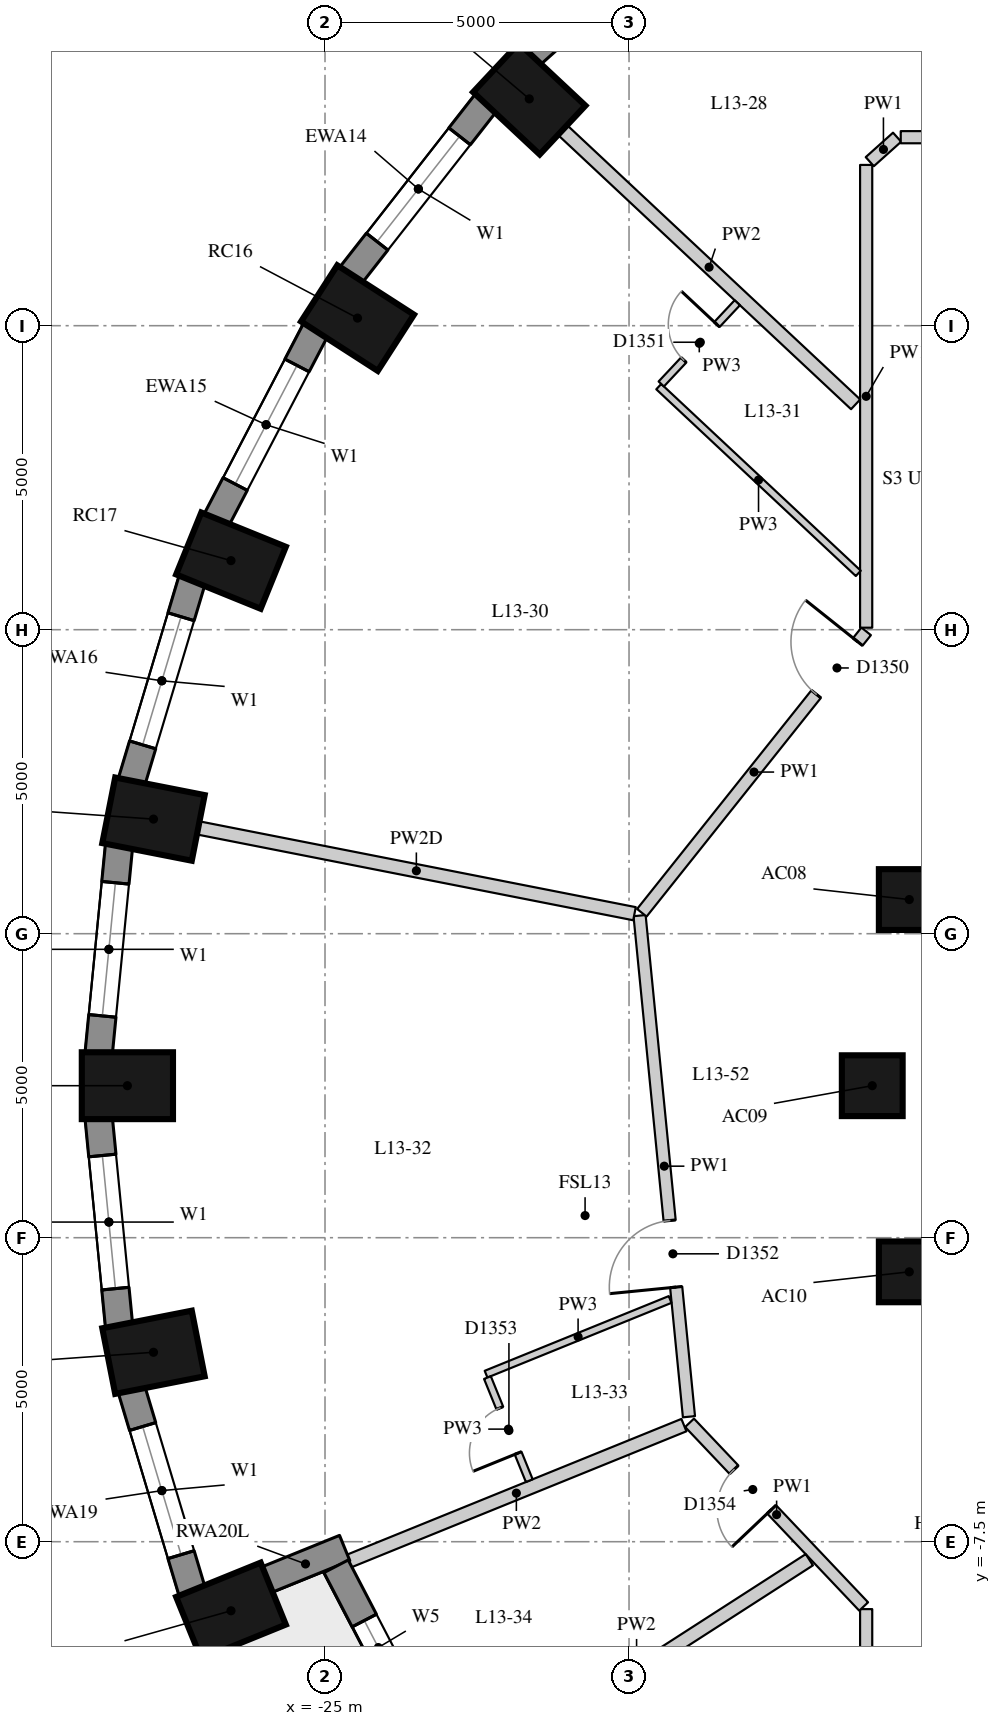
"""IFC4 building model, lengths in metres.
Left out: names, types, materials, properties, quantities, classifications, styles, units other than length and angle.
Written with IfcOpenShell. Run it as: python <this file> out.ifc"""

import sys

from ifc_helpers import new_model, si_unit, direction, frame, frame_2d, origin, origin_2d, place, context, subcontext, project, spatial, rectangle, extrude, element, fill, save


model = new_model("IFC4")
c1 = context("Model", 3, precision=1e-05, world=origin(), true_north=direction((0.0, 1.0)))
c2 = subcontext(c1, "Body", "Model", "MODEL_VIEW")
j1 = project(units=[si_unit("LENGTHUNIT", "METRE"), si_unit("PLANEANGLEUNIT", "RADIAN")], contexts=[c1])
p1 = place(None, origin())
s1 = spatial("IfcSite", under=j1, at=p1, CompositionType="ELEMENT")
p2 = place(p1, origin())
s2 = spatial("IfcBuilding", under=s1, at=p2, CompositionType="ELEMENT")
p3 = place(p2, frame((0.0, 0.0, 51.4)))
s3 = spatial("IfcBuildingStorey", under=s2, at=p3, CompositionType="ELEMENT", Elevation=51.4)
for number, where, z_axis, x_axis in (
    (1, (-21.641, 16.23, 0.0), (0.0, 0.0, 1.0), (-0.73, 0.683, 0.0)),
    (2, (-24.465, 12.625, 0.0), (0.0, 0.0, 1.0), (-0.841, 0.541, 0.0)),
    (3, (-26.546, 8.636, 0.0), (0.0, 0.0, 1.0), (-0.927, 0.376, 0.0)),
    (4, (-27.821, 4.385, 0.0), (0.0, 0.0, 1.0), (-0.981, 0.193, 0.0)),
    (5, (-28.25, 0.0, 0.0), (0.0, 0.0, 1.0), (-1.0, 0.0, 0.0)),
    (6, (-27.821, -4.385, 0.0), (0.0, 0.0, 1.0), (-0.981, -0.193, 0.0)),
    (7, (-26.546, -8.636, 0.0), (0.0, 0.0, 1.0), (-0.927, -0.376, 0.0)),
):
    element("IfcColumn", number, at=place(p3, frame(where, z_axis=z_axis, x_axis=x_axis)), inside=s3, PredefinedType="COLUMN", context=c2, shape_type="SweptSolid", body=[
        extrude(rectangle(XDim=1.5, YDim=1.1, at=origin_2d()), origin(), (0.0, 0.0, 1.0), 3.3),
    ])
for number, where, z_axis, x_axis in (
    (8, (-15.391, 3.062, 0.0), (0.0, 0.0, 1.0), (1.0, 0.0, 0.0)),
    (9, (-16.0, 0.0, 0.0), (0.0, 0.0, 1.0), (1.0, 0.0, 0.0)),
    (10, (-15.391, -3.062, 0.0), (0.0, 0.0, 1.0), (1.0, 0.0, 0.0)),
):
    element("IfcColumn", number, at=place(p3, frame(where, z_axis=z_axis, x_axis=x_axis)), inside=s3, PredefinedType="COLUMN", context=c2, shape_type="SweptSolid", body=[
        extrude(rectangle(XDim=1.0, YDim=1.0, at=origin_2d()), origin(), (0.0, 0.0, 1.0), 3.3),
    ])
p4 = place(p3, frame((-18.871, 19.407, 0.0), z_axis=(0.0, 0.0, 1.0), x_axis=(-0.745526233716, -0.66647628228, 0.0)))
e11 = element("IfcWall", 11, at=p4, inside=s3, PredefinedType="SOLIDWALL", context=c2, shape_type="SweptSolid", body=[
    extrude(rectangle(XDim=3.697, YDim=0.45, at=frame_2d((1.848, 0.0))), origin(), (0.0, 0.0, 1.0), 3.02),
])
p5 = place(p4, frame((0.749, 0.0, 0.4)))
e12 = element("IfcOpeningElement", 12, at=p5, cuts=e11, PredefinedType="OPENING", context=c2, shape_type="SweptSolid", body=[
    extrude(rectangle(XDim=2.2, YDim=1.75, at=frame_2d((1.1, 0.875))), frame((0.0, 0.235, 0.0), z_axis=(0.0, -1.0, 0.0), x_axis=(1.0, 0.0, 0.0)), (0.0, 0.0, 1.0), 0.47),
])
p6 = place(p3, frame((-22.352, 16.17, 0.0), z_axis=(0.0, 0.0, 1.0), x_axis=(-0.616661975264, -0.787228053529, 0.0)))
e13 = element("IfcWall", 13, at=p6, inside=s3, PredefinedType="SOLIDWALL", context=c2, shape_type="SweptSolid", body=[
    extrude(rectangle(XDim=3.61, YDim=0.45, at=frame_2d((1.805, 0.0))), origin(), (0.0, 0.0, 1.0), 3.02),
])
p7 = place(p6, frame((0.705, 0.0, 0.4)))
e14 = element("IfcOpeningElement", 14, at=p7, cuts=e13, PredefinedType="OPENING", context=c2, shape_type="SweptSolid", body=[
    extrude(rectangle(XDim=2.2, YDim=1.75, at=frame_2d((1.1, 0.875))), frame((0.0, 0.235, 0.0), z_axis=(0.0, -1.0, 0.0), x_axis=(1.0, 0.0, 0.0)), (0.0, 0.0, 1.0), 0.47),
])
p8 = place(p3, frame((-25.152, 12.437, 0.0), z_axis=(0.0, 0.0, 1.0), x_axis=(-0.462492775226, -0.886623050041, 0.0)))
e15 = element("IfcWall", 15, at=p8, inside=s3, PredefinedType="SOLIDWALL", context=c2, shape_type="SweptSolid", body=[
    extrude(rectangle(XDim=3.532, YDim=0.45, at=frame_2d((1.766, 0.0))), origin(), (0.0, 0.0, 1.0), 3.02),
])
p9 = place(p8, frame((0.666, 0.0, 0.4)))
e16 = element("IfcOpeningElement", 16, at=p9, cuts=e15, PredefinedType="OPENING", context=c2, shape_type="SweptSolid", body=[
    extrude(rectangle(XDim=2.2, YDim=1.75, at=frame_2d((1.1, 0.875))), frame((0.0, 0.235, 0.0), z_axis=(0.0, -1.0, 0.0), x_axis=(1.0, 0.0, 0.0)), (0.0, 0.0, 1.0), 0.47),
])
p10 = place(p3, frame((-27.185, 8.323, 0.0), z_axis=(0.0, 0.0, 1.0), x_axis=(-0.287064133733, -0.957911364963, 0.0)))
e17 = element("IfcWall", 17, at=p10, inside=s3, PredefinedType="SOLIDWALL", context=c2, shape_type="SweptSolid", body=[
    extrude(rectangle(XDim=3.473, YDim=0.45, at=frame_2d((1.737, 0.0))), origin(), (0.0, 0.0, 1.0), 3.02),
])
p11 = place(p10, frame((0.637, 0.0, 0.4)))
e18 = element("IfcOpeningElement", 18, at=p11, cuts=e17, PredefinedType="OPENING", context=c2, shape_type="SweptSolid", body=[
    extrude(rectangle(XDim=2.2, YDim=1.75, at=frame_2d((1.1, 0.875))), frame((0.0, 0.235, 0.0), z_axis=(0.0, -1.0, 0.0), x_axis=(1.0, 0.0, 0.0)), (0.0, 0.0, 1.0), 0.47),
])
p12 = place(p3, frame((-28.387, 3.956, 0.0), z_axis=(0.0, 0.0, 1.0), x_axis=(-0.097389581596, -0.995246336038, 0.0)))
e19 = element("IfcWall", 19, at=p12, inside=s3, PredefinedType="SOLIDWALL", context=c2, shape_type="SweptSolid", body=[
    extrude(rectangle(XDim=3.442, YDim=0.45, at=frame_2d((1.721, 0.0))), origin(), (0.0, 0.0, 1.0), 3.02),
])
p13 = place(p12, frame((0.621, 0.0, 0.4)))
e20 = element("IfcOpeningElement", 20, at=p13, cuts=e19, PredefinedType="OPENING", context=c2, shape_type="SweptSolid", body=[
    extrude(rectangle(XDim=2.2, YDim=1.75, at=frame_2d((1.1, 0.875))), frame((0.0, 0.235, 0.0), z_axis=(0.0, -1.0, 0.0), x_axis=(1.0, 0.0, 0.0)), (0.0, 0.0, 1.0), 0.47),
])
p14 = place(p3, frame((-28.722, -0.53, 0.0), z_axis=(0.0, 0.0, 1.0), x_axis=(0.097389581596, -0.995246336038, 0.0)))
e21 = element("IfcWall", 21, at=p14, inside=s3, PredefinedType="SOLIDWALL", context=c2, shape_type="SweptSolid", body=[
    extrude(rectangle(XDim=3.442, YDim=0.45, at=frame_2d((1.721, 0.0))), origin(), (0.0, 0.0, 1.0), 3.02),
])
p15 = place(p14, frame((0.621, 0.0, 0.4)))
e22 = element("IfcOpeningElement", 22, at=p15, cuts=e21, PredefinedType="OPENING", context=c2, shape_type="SweptSolid", body=[
    extrude(rectangle(XDim=2.2, YDim=1.75, at=frame_2d((1.1, 0.875))), frame((0.0, 0.235, 0.0), z_axis=(0.0, -1.0, 0.0), x_axis=(1.0, 0.0, 0.0)), (0.0, 0.0, 1.0), 0.47),
])
p16 = place(p3, frame((-28.182, -4.996, 0.0), z_axis=(0.0, 0.0, 1.0), x_axis=(0.287064133733, -0.957911364963, 0.0)))
e23 = element("IfcWall", 23, at=p16, inside=s3, PredefinedType="SOLIDWALL", context=c2, shape_type="SweptSolid", body=[
    extrude(rectangle(XDim=3.473, YDim=0.45, at=frame_2d((1.737, 0.0))), origin(), (0.0, 0.0, 1.0), 3.02),
])
p17 = place(p16, frame((0.637, 0.0, 0.4)))
e24 = element("IfcOpeningElement", 24, at=p17, cuts=e23, PredefinedType="OPENING", context=c2, shape_type="SweptSolid", body=[
    extrude(rectangle(XDim=2.2, YDim=1.75, at=frame_2d((1.1, 0.875))), frame((0.0, 0.235, 0.0), z_axis=(0.0, -1.0, 0.0), x_axis=(1.0, 0.0, 0.0)), (0.0, 0.0, 1.0), 0.47),
])
p18 = place(p3, frame((-25.965, -8.127, 0.0), z_axis=(0.0, 0.0, 1.0), x_axis=(0.926575599743, 0.376108572039, 0.0)))
e25 = element("IfcWall", 25, at=p18, inside=s3, PredefinedType="SOLIDWALL", context=c2, shape_type="SweptSolid", body=[
    extrude(rectangle(XDim=1.39, YDim=0.45, at=frame_2d((0.695, 0.0))), origin(), (0.0, 0.0, 1.0), 3.02),
])
p19 = place(p3, frame((-24.818, -7.905, 0.0), z_axis=(0.0, 0.0, 1.0), x_axis=(0.461517123562, -0.887131300687, 0.0)))
e26 = element("IfcWall", 26, at=p19, inside=s3, PredefinedType="SOLIDWALL", context=c2, shape_type="SweptSolid", body=[
    extrude(rectangle(XDim=4.162, YDim=0.45, at=frame_2d((2.081, 0.0))), origin(), (0.0, 0.0, 1.0), 3.02),
])
p20 = place(p19, frame((1.006, 0.0, 0.4)))
e27 = element("IfcOpeningElement", 27, at=p20, cuts=e26, PredefinedType="OPENING", context=c2, shape_type="SweptSolid", body=[
    extrude(rectangle(XDim=1.0, YDim=1.75, at=frame_2d((0.5, 0.875))), frame((0.0, 0.235, 0.0), z_axis=(0.0, -1.0, 0.0), x_axis=(1.0, 0.0, 0.0)), (0.0, 0.0, 1.0), 0.47),
])
p21 = place(p19, frame((2.156, 0.0, 0.0)))
e28 = element("IfcOpeningElement", 28, at=p21, cuts=e26, PredefinedType="OPENING", context=c2, shape_type="SweptSolid", body=[
    extrude(rectangle(XDim=1.0, YDim=2.15, at=frame_2d((0.5, 1.075))), frame((0.0, 0.235, 0.0), z_axis=(0.0, -1.0, 0.0), x_axis=(1.0, 0.0, 0.0)), (0.0, 0.0, 1.0), 0.47),
])
p22 = place(p3, frame((-16.1, -11.853, 0.0), z_axis=(0.0, 0.0, 1.0), x_axis=(0.0, 1.0, 0.0)))
e29 = element("IfcWall", 29, at=p22, inside=s3, PredefinedType="PARTITIONING", context=c2, shape_type="SweptSolid", body=[
    extrude(rectangle(XDim=3.244, YDim=0.2, at=frame_2d((1.622, 0.0))), origin(), (0.0, 0.0, 1.0), 3.02),
])
p23 = place(p22, frame((0.22, 0.0, 0.0)))
e30 = element("IfcOpeningElement", 30, at=p23, cuts=e29, PredefinedType="OPENING", context=c2, shape_type="SweptSolid", body=[
    extrude(rectangle(XDim=1.1, YDim=2.1, at=frame_2d((0.55, 1.05))), frame((0.0, 0.11, 0.0), z_axis=(0.0, -1.0, 0.0), x_axis=(1.0, 0.0, 0.0)), (0.0, 0.0, 1.0), 0.22),
])
p24 = place(p3, frame((-16.141, -8.566, 0.0), z_axis=(0.0, 0.0, 1.0), x_axis=(-0.687938220375, 0.725769250483, 0.0)))
e31 = element("IfcWall", 31, at=p24, inside=s3, PredefinedType="PARTITIONING", context=c2, shape_type="SweptSolid", body=[
    extrude(rectangle(XDim=4.162, YDim=0.2, at=frame_2d((2.081, 0.0))), origin(), (0.0, 0.0, 1.0), 3.02),
])
p25 = place(p24, frame((2.201, 0.0, 0.0)))
e32 = element("IfcOpeningElement", 32, at=p25, cuts=e31, PredefinedType="OPENING", context=c2, shape_type="SweptSolid", body=[
    extrude(rectangle(XDim=0.9, YDim=2.1, at=frame_2d((0.45, 1.05))), frame((0.0, 0.11, 0.0), z_axis=(0.0, -1.0, 0.0), x_axis=(1.0, 0.0, 0.0)), (0.0, 0.0, 1.0), 0.22),
])
p26 = place(p3, frame((-19.014, -5.445, 0.0), z_axis=(0.0, 0.0, 1.0), x_axis=(-0.098076369896, 0.995178891289, 0.0)))
e33 = element("IfcWall", 33, at=p26, inside=s3, PredefinedType="PARTITIONING", context=c2, shape_type="SweptSolid", body=[
    extrude(rectangle(XDim=8.282, YDim=0.2, at=frame_2d((4.141, 0.0))), origin(), (0.0, 0.0, 1.0), 3.02),
])
p27 = place(p26, frame((2.142, 0.0, 0.0)))
e34 = element("IfcOpeningElement", 34, at=p27, cuts=e33, PredefinedType="OPENING", context=c2, shape_type="SweptSolid", body=[
    extrude(rectangle(XDim=1.1, YDim=2.1, at=frame_2d((0.55, 1.05))), frame((0.0, 0.11, 0.0), z_axis=(0.0, -1.0, 0.0), x_axis=(1.0, 0.0, 0.0)), (0.0, 0.0, 1.0), 0.22),
])
p28 = place(p3, frame((-19.789, 2.844, 0.0), z_axis=(0.0, 0.0, 1.0), x_axis=(0.623300670662, 0.781982272147, 0.0)))
e35 = element("IfcWall", 35, at=p28, inside=s3, PredefinedType="PARTITIONING", context=c2, shape_type="SweptSolid", body=[
    extrude(rectangle(XDim=5.919, YDim=0.2, at=frame_2d((2.959, 0.0))), origin(), (0.0, 0.0, 1.0), 3.02),
])
p29 = place(p28, frame((4.599, 0.0, 0.0)))
e36 = element("IfcOpeningElement", 36, at=p29, cuts=e35, PredefinedType="OPENING", context=c2, shape_type="SweptSolid", body=[
    extrude(rectangle(XDim=1.1, YDim=2.1, at=frame_2d((0.55, 1.05))), frame((0.0, 0.11, 0.0), z_axis=(0.0, -1.0, 0.0), x_axis=(1.0, 0.0, 0.0)), (0.0, 0.0, 1.0), 0.22),
])
p30 = place(p3, frame((-16.1, 7.533, 0.0), z_axis=(0.0, 0.0, 1.0), x_axis=(0.0, 1.0, 0.0)))
e37 = element("IfcWall", 37, at=p30, inside=s3, PredefinedType="PARTITIONING", context=c2, shape_type="SweptSolid", body=[
    extrude(rectangle(XDim=7.611, YDim=0.2, at=frame_2d((3.806, 0.0))), origin(), (0.0, 0.0, 1.0), 3.02),
])
p31 = place(p3, frame((-16.041, 15.198, 0.0), z_axis=(0.0, 0.0, 1.0), x_axis=(0.744722115519, 0.667374685359, 0.0)))
e38 = element("IfcWall", 38, at=p31, inside=s3, PredefinedType="PARTITIONING", context=c2, shape_type="SweptSolid", body=[
    extrude(rectangle(XDim=0.603, YDim=0.2, at=frame_2d((0.301, 0.0))), origin(), (0.0, 0.0, 1.0), 3.02),
])
p32 = place(p3, frame((-15.531, 15.6, 0.0), z_axis=(0.0, 0.0, 1.0), x_axis=(1.0, 0.0, 0.0)))
e39 = element("IfcWall", 39, at=p32, inside=s3, PredefinedType="PARTITIONING", context=c2, shape_type="SweptSolid", body=[
    extrude(rectangle(XDim=7.632, YDim=0.2, at=frame_2d((3.816, 0.0))), origin(), (0.0, 0.0, 1.0), 3.02),
])
p33 = place(p32, frame((5.283, 0.0, 0.0)))
e40 = element("IfcOpeningElement", 40, at=p33, cuts=e39, PredefinedType="OPENING", context=c2, shape_type="SweptSolid", body=[
    extrude(rectangle(XDim=1.0, YDim=2.1, at=frame_2d((0.5, 1.05))), frame((0.0, 0.11, 0.0), z_axis=(0.0, -1.0, 0.0), x_axis=(1.0, 0.0, 0.0)), (0.0, 0.0, 1.0), 0.22),
])
p34 = place(p32, frame((0.451, 0.0, 0.0)))
e41 = element("IfcOpeningElement", 41, at=p34, cuts=e39, PredefinedType="OPENING", context=c2, shape_type="SweptSolid", body=[
    extrude(rectangle(XDim=1.1, YDim=2.1, at=frame_2d((0.55, 1.05))), frame((0.0, 0.11, 0.0), z_axis=(0.0, -1.0, 0.0), x_axis=(1.0, 0.0, 0.0)), (0.0, 0.0, 1.0), 0.22),
])
p35 = place(p3, frame((-21.093, 15.718, 0.0), z_axis=(0.0, 0.0, 1.0), x_axis=(0.73009284205, -0.683347965525, 0.0)))
e42 = element("IfcWall", 42, at=p35, inside=s3, PredefinedType="PARTITIONING", context=c2, shape_type="SweptSolid", body=[
    extrude(rectangle(XDim=6.602, YDim=0.22, at=frame_2d((3.301, 0.0))), origin(), (0.0, 0.0, 1.0), 3.02),
])
p36 = place(p3, frame((-27.085, 4.24, 0.0), z_axis=(0.0, 0.0, 1.0), x_axis=(0.981202333999, -0.192981811981, 0.0)))
e43 = element("IfcWall", 43, at=p36, inside=s3, PredefinedType="PARTITIONING", context=c2, shape_type="SweptSolid", body=[
    extrude(rectangle(XDim=7.312, YDim=0.22, at=frame_2d((3.656, 0.0))), origin(), (0.0, 0.0, 1.0), 2.47),
])
p37 = place(p3, frame((-24.609, -7.82, 0.0), z_axis=(0.0, 0.0, 1.0), x_axis=(0.926562262773, 0.376141427131, 0.0)))
e44 = element("IfcWall", 44, at=p37, inside=s3, PredefinedType="PARTITIONING", context=c2, shape_type="SweptSolid", body=[
    extrude(rectangle(XDim=5.948, YDim=0.22, at=frame_2d((2.974, 0.0))), origin(), (0.0, 0.0, 1.0), 3.02),
])
p38 = place(p3, frame((-22.717, -11.456, 0.0), z_axis=(0.0, 0.0, 1.0), x_axis=(0.840775666807, 0.541383669965, 0.0)))
e45 = element("IfcWall", 45, at=p38, inside=s3, PredefinedType="PARTITIONING", context=c2, shape_type="SweptSolid", body=[
    extrude(rectangle(XDim=6.759, YDim=0.22, at=frame_2d((3.379, 0.0))), origin(), (0.0, 0.0, 1.0), 3.02),
])
p39 = place(p3, frame((-16.229, 8.426, 0.0), z_axis=(0.0, 0.0, 1.0), x_axis=(-0.730077325201, 0.683364543438, 0.0)))
e46 = element("IfcWall", 46, at=p39, inside=s3, PredefinedType="PARTITIONING", context=c2, shape_type="SweptSolid", body=[
    extrude(rectangle(XDim=4.495, YDim=0.12, at=frame_2d((2.247, 0.0))), origin(), (0.0, 0.0, 1.0), 3.02),
])
p40 = place(p3, frame((-19.324, -3.516, 0.0), z_axis=(0.0, 0.0, 1.0), x_axis=(-0.926573216048, -0.376114444421, 0.0)))
e47 = element("IfcWall", 47, at=p40, inside=s3, PredefinedType="PARTITIONING", context=c2, shape_type="SweptSolid", body=[
    extrude(rectangle(XDim=3.267, YDim=0.12, at=frame_2d((1.634, 0.0))), origin(), (0.0, 0.0, 1.0), 3.02),
])
p41 = place(p3, frame((-19.47, 11.542, 0.0), z_axis=(0.0, 0.0, 1.0), x_axis=(0.683306289544, 0.730131847456, 0.0)))
e48 = element("IfcWall", 48, at=p41, inside=s3, PredefinedType="PARTITIONING", context=c2, shape_type="SweptSolid", body=[
    extrude(rectangle(XDim=1.83, YDim=0.12, at=frame_2d((0.915, 0.0))), origin(), (0.0, 0.0, 1.0), 3.02),
])
p42 = place(p41, frame((0.54, 0.0, 0.0)))
e49 = element("IfcOpeningElement", 49, at=p42, cuts=e48, PredefinedType="OPENING", context=c2, shape_type="SweptSolid", body=[
    extrude(rectangle(XDim=0.8, YDim=2.1, at=frame_2d((0.4, 1.05))), frame((0.0, 0.07, 0.0), z_axis=(0.0, -1.0, 0.0), x_axis=(1.0, 0.0, 0.0)), (0.0, 0.0, 1.0), 0.14),
])
p43 = place(p3, frame((-22.329, -4.801, 0.0), z_axis=(0.0, 0.0, 1.0), x_axis=(0.376101474088, -0.926578480858, 0.0)))
e50 = element("IfcWall", 50, at=p43, inside=s3, PredefinedType="PARTITIONING", context=c2, shape_type="SweptSolid", body=[
    extrude(rectangle(XDim=1.83, YDim=0.12, at=frame_2d((0.915, 0.0))), origin(), (0.0, 0.0, 1.0), 3.02),
])
p44 = place(p43, frame((0.54, 0.0, 0.0)))
e51 = element("IfcOpeningElement", 51, at=p44, cuts=e50, PredefinedType="OPENING", context=c2, shape_type="SweptSolid", body=[
    extrude(rectangle(XDim=0.8, YDim=2.1, at=frame_2d((0.4, 1.05))), frame((0.0, 0.07, 0.0), z_axis=(0.0, -1.0, 0.0), x_axis=(1.0, 0.0, 0.0)), (0.0, 0.0, 1.0), 0.14),
])
p45 = place(p7, origin())
e52 = element("IfcWindow", 52, at=p45, inside=s3, PartitioningType="SINGLE_PANEL", PredefinedType="WINDOW", context=c2, shape_type="SweptSolid", body=[
    extrude(rectangle(XDim=2.2, YDim=1.75, at=frame_2d((1.1, 0.875))), frame((0.0, 0.035, 0.0), z_axis=(0.0, -1.0, 0.0), x_axis=(1.0, 0.0, 0.0)), (0.0, 0.0, 1.0), 0.06),
])
fill(e14, e52)
p46 = place(p9, origin())
e53 = element("IfcWindow", 53, at=p46, inside=s3, PartitioningType="SINGLE_PANEL", PredefinedType="WINDOW", context=c2, shape_type="SweptSolid", body=[
    extrude(rectangle(XDim=2.2, YDim=1.75, at=frame_2d((1.1, 0.875))), frame((0.0, 0.035, 0.0), z_axis=(0.0, -1.0, 0.0), x_axis=(1.0, 0.0, 0.0)), (0.0, 0.0, 1.0), 0.06),
])
fill(e16, e53)
p47 = place(p11, origin())
e54 = element("IfcWindow", 54, at=p47, inside=s3, PartitioningType="SINGLE_PANEL", PredefinedType="WINDOW", context=c2, shape_type="SweptSolid", body=[
    extrude(rectangle(XDim=2.2, YDim=1.75, at=frame_2d((1.1, 0.875))), frame((0.0, 0.035, 0.0), z_axis=(0.0, -1.0, 0.0), x_axis=(1.0, 0.0, 0.0)), (0.0, 0.0, 1.0), 0.06),
])
fill(e18, e54)
p48 = place(p13, origin())
e55 = element("IfcWindow", 55, at=p48, inside=s3, PartitioningType="SINGLE_PANEL", PredefinedType="WINDOW", context=c2, shape_type="SweptSolid", body=[
    extrude(rectangle(XDim=2.2, YDim=1.75, at=frame_2d((1.1, 0.875))), frame((0.0, 0.035, 0.0), z_axis=(0.0, -1.0, 0.0), x_axis=(1.0, 0.0, 0.0)), (0.0, 0.0, 1.0), 0.06),
])
fill(e20, e55)
p49 = place(p15, origin())
e56 = element("IfcWindow", 56, at=p49, inside=s3, PartitioningType="SINGLE_PANEL", PredefinedType="WINDOW", context=c2, shape_type="SweptSolid", body=[
    extrude(rectangle(XDim=2.2, YDim=1.75, at=frame_2d((1.1, 0.875))), frame((0.0, 0.035, 0.0), z_axis=(0.0, -1.0, 0.0), x_axis=(1.0, 0.0, 0.0)), (0.0, 0.0, 1.0), 0.06),
])
fill(e22, e56)
p50 = place(p17, origin())
e57 = element("IfcWindow", 57, at=p50, inside=s3, PartitioningType="SINGLE_PANEL", PredefinedType="WINDOW", context=c2, shape_type="SweptSolid", body=[
    extrude(rectangle(XDim=2.2, YDim=1.75, at=frame_2d((1.1, 0.875))), frame((0.0, 0.035, 0.0), z_axis=(0.0, -1.0, 0.0), x_axis=(1.0, 0.0, 0.0)), (0.0, 0.0, 1.0), 0.06),
])
fill(e24, e57)
p51 = place(p20, origin())
e58 = element("IfcWindow", 58, at=p51, inside=s3, PartitioningType="SINGLE_PANEL", PredefinedType="WINDOW", context=c2, shape_type="SweptSolid", body=[
    extrude(rectangle(XDim=1.0, YDim=1.75, at=frame_2d((0.5, 0.875))), frame((0.0, 0.035, 0.0), z_axis=(0.0, -1.0, 0.0), x_axis=(1.0, 0.0, 0.0)), (0.0, 0.0, 1.0), 0.06),
])
fill(e27, e58)
p52 = place(p29, origin())
e59 = element("IfcDoor", 59, at=p52, inside=s3, OperationType="SINGLE_SWING_RIGHT", PredefinedType="DOOR", context=c2, shape_type="SweptSolid", body=[
    extrude(rectangle(XDim=1.1, YDim=2.1, at=frame_2d((0.55, 1.05))), frame((0.0, 0.025, 0.0), z_axis=(0.0, -1.0, 0.0), x_axis=(1.0, 0.0, 0.0)), (0.0, 0.0, 1.0), 0.05),
])
fill(e36, e59)
p53 = place(p42, origin())
e60 = element("IfcDoor", 60, at=p53, inside=s3, OperationType="SINGLE_SWING_RIGHT", PredefinedType="DOOR", context=c2, shape_type="SweptSolid", body=[
    extrude(rectangle(XDim=0.8, YDim=2.1, at=frame_2d((0.4, 1.05))), frame((0.0, 0.025, 0.0), z_axis=(0.0, -1.0, 0.0), x_axis=(1.0, 0.0, 0.0)), (0.0, 0.0, 1.0), 0.05),
])
fill(e49, e60)
p54 = place(p27, origin())
e61 = element("IfcDoor", 61, at=p54, inside=s3, OperationType="SINGLE_SWING_LEFT", PredefinedType="DOOR", context=c2, shape_type="SweptSolid", body=[
    extrude(rectangle(XDim=1.1, YDim=2.1, at=frame_2d((0.55, 1.05))), frame((0.0, 0.025, 0.0), z_axis=(0.0, -1.0, 0.0), x_axis=(1.0, 0.0, 0.0)), (0.0, 0.0, 1.0), 0.05),
])
fill(e34, e61)
p55 = place(p44, origin())
e62 = element("IfcDoor", 62, at=p55, inside=s3, OperationType="SINGLE_SWING_LEFT", PredefinedType="DOOR", context=c2, shape_type="SweptSolid", body=[
    extrude(rectangle(XDim=0.8, YDim=2.1, at=frame_2d((0.4, 1.05))), frame((0.0, 0.025, 0.0), z_axis=(0.0, -1.0, 0.0), x_axis=(1.0, 0.0, 0.0)), (0.0, 0.0, 1.0), 0.05),
])
fill(e51, e62)
p56 = place(p25, origin())
e63 = element("IfcDoor", 63, at=p56, inside=s3, OperationType="SINGLE_SWING_LEFT", PredefinedType="DOOR", context=c2, shape_type="SweptSolid", body=[
    extrude(rectangle(XDim=0.9, YDim=2.1, at=frame_2d((0.45, 1.05))), frame((0.0, 0.025, 0.0), z_axis=(0.0, -1.0, 0.0), x_axis=(1.0, 0.0, 0.0)), (0.0, 0.0, 1.0), 0.05),
])
fill(e32, e63)
save(model, sys.argv[1])
